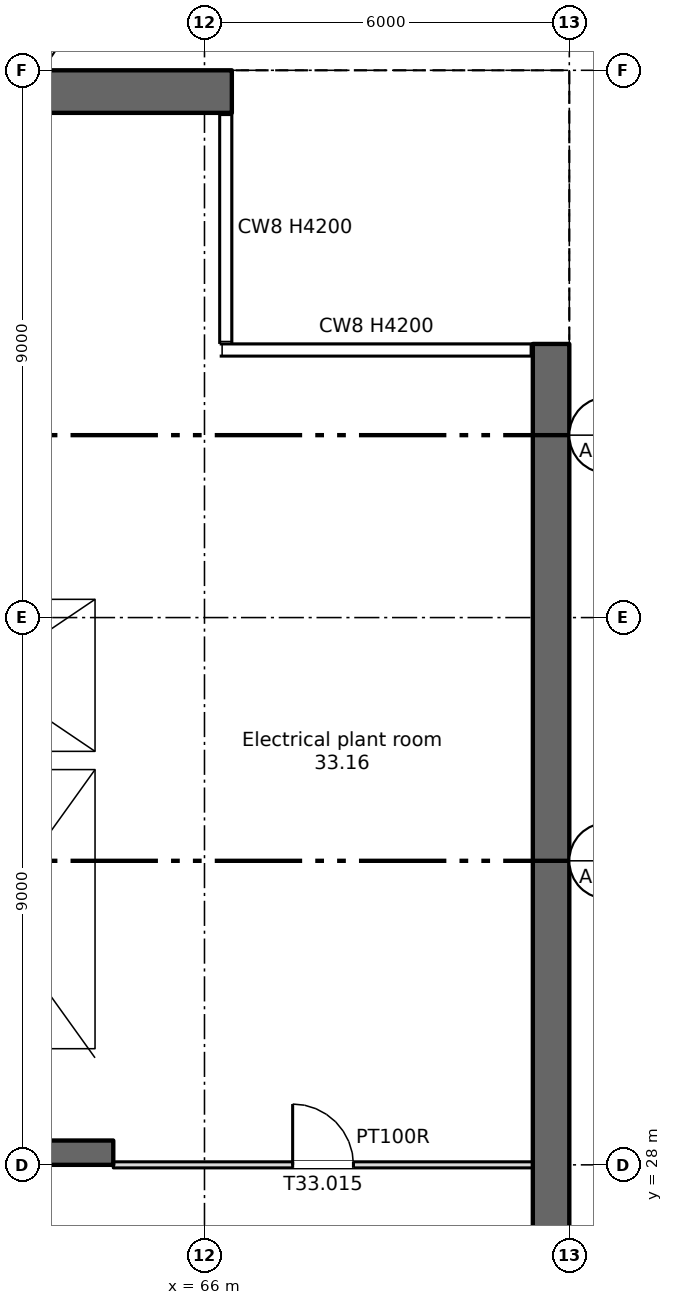
"""IFC4 building model, lengths in metres.
Left out: names, types, materials, properties, quantities, classifications, styles, units other than length and angle.
Written with IfcOpenShell. Run it as: python <this file> out.ifc"""

import sys

from ifc_helpers import new_model, si_unit, direction, frame, frame_2d, origin, place, context, subcontext, project, spatial, rectangle, extrude, element, fill, save


model = new_model("IFC4")
c1 = context("Model", 3, precision=1e-05, world=origin(), true_north=direction((0.0, 1.0)))
c2 = subcontext(c1, "Body", "Model", "MODEL_VIEW")
j1 = project(units=[si_unit("LENGTHUNIT", "METRE"), si_unit("PLANEANGLEUNIT", "RADIAN")], contexts=[c1])
p1 = place(None, origin())
s1 = spatial("IfcSite", under=j1, at=p1, CompositionType="ELEMENT")
p2 = place(p1, origin())
s2 = spatial("IfcBuilding", under=s1, at=p2, CompositionType="ELEMENT")
p3 = place(p2, frame((0.0, 0.0, 226.75)))
s3 = spatial("IfcBuildingStorey", under=s2, at=p3, CompositionType="ELEMENT", Elevation=226.75)
p4 = place(p3, frame((71.7, 7.5, 0.0), z_axis=(0.0, 0.0, 1.0), x_axis=(0.0, 1.0, 0.0)))
e1 = element("IfcWall", 1, at=p4, inside=s3, PredefinedType="SHEAR", context=c2, shape_type="SweptSolid", body=[
    extrude(rectangle(XDim=34.0, YDim=0.6, at=frame_2d((17.0, 0.0))), origin(), (0.0, 0.0, 1.0), 4.2),
])
p5 = place(p3, frame((11.55, 45.65, 0.0), z_axis=(0.0, 0.0, 1.0), x_axis=(1.0, 0.0, 0.0)))
e2 = element("IfcWall", 2, at=p5, inside=s3, PredefinedType="SHEAR", context=c2, shape_type="SweptSolid", body=[
    extrude(rectangle(XDim=54.9, YDim=0.7, at=frame_2d((27.45, 0.0))), origin(), (0.0, 0.0, 1.0), 4.2),
])
p6 = place(p3, frame((6.6, 28.2, 0.0), z_axis=(0.0, 0.0, 1.0), x_axis=(1.0, 0.0, 0.0)))
e3 = element("IfcWall", 3, at=p6, inside=s3, PredefinedType="SHEAR", context=c2, shape_type="SweptSolid", body=[
    extrude(rectangle(XDim=57.9, YDim=0.4, at=frame_2d((28.95, 0.0))), origin(), (0.0, 0.0, 1.0), 4.2),
])
p7 = place(p6, frame((13.95, 0.0, 0.0)))
e4 = element("IfcOpeningElement", 4, at=p7, cuts=e3, PredefinedType="OPENING", context=c2, shape_type="SweptSolid", body=[
    extrude(rectangle(XDim=0.9, YDim=2.1, at=frame_2d((0.45, 1.05))), frame((0.0, 0.21, 0.0), z_axis=(0.0, -1.0, 0.0), x_axis=(1.0, 0.0, 0.0)), (0.0, 0.0, 1.0), 0.42),
])
p8 = place(p6, frame((49.95, 0.0, 0.0)))
e5 = element("IfcOpeningElement", 5, at=p8, cuts=e3, PredefinedType="OPENING", context=c2, shape_type="SweptSolid", body=[
    extrude(rectangle(XDim=0.9, YDim=2.1, at=frame_2d((0.45, 1.05))), frame((0.0, 0.21, 0.0), z_axis=(0.0, -1.0, 0.0), x_axis=(1.0, 0.0, 0.0)), (0.0, 0.0, 1.0), 0.42),
])
p9 = place(p6, frame((1.45, 0.0, 0.0)))
e6 = element("IfcOpeningElement", 6, at=p9, cuts=e3, PredefinedType="OPENING", context=c2, shape_type="SweptSolid", body=[
    extrude(rectangle(XDim=0.9, YDim=2.1, at=frame_2d((0.45, 1.05))), frame((0.0, 0.21, 0.0), z_axis=(0.0, -1.0, 0.0), x_axis=(1.0, 0.0, 0.0)), (0.0, 0.0, 1.0), 0.42),
])
p10 = place(p6, frame((4.8, 0.0, 0.0)))
e7 = element("IfcOpeningElement", 7, at=p10, cuts=e3, PredefinedType="OPENING", context=c2, shape_type="SweptSolid", body=[
    extrude(rectangle(XDim=1.2, YDim=2.1, at=frame_2d((0.6, 1.05))), frame((0.0, 0.21, 0.0), z_axis=(0.0, -1.0, 0.0), x_axis=(1.0, 0.0, 0.0)), (0.0, 0.0, 1.0), 0.42),
])
p11 = place(p6, frame((31.8, 0.0, 0.0)))
e8 = element("IfcOpeningElement", 8, at=p11, cuts=e3, PredefinedType="OPENING", context=c2, shape_type="SweptSolid", body=[
    extrude(rectangle(XDim=1.2, YDim=2.1, at=frame_2d((0.6, 1.05))), frame((0.0, 0.21, 0.0), z_axis=(0.0, -1.0, 0.0), x_axis=(1.0, 0.0, 0.0)), (0.0, 0.0, 1.0), 0.42),
])
p12 = place(p6, frame((55.3, 0.0, 0.0)))
e9 = element("IfcOpeningElement", 9, at=p12, cuts=e3, PredefinedType="OPENING", context=c2, shape_type="SweptSolid", body=[
    extrude(rectangle(XDim=1.2, YDim=2.1, at=frame_2d((0.6, 1.05))), frame((0.0, 0.21, 0.0), z_axis=(0.0, -1.0, 0.0), x_axis=(1.0, 0.0, 0.0)), (0.0, 0.0, 1.0), 0.42),
])
p13 = place(p6, frame((21.8, 0.0, 0.0)))
e10 = element("IfcOpeningElement", 10, at=p13, cuts=e3, PredefinedType="OPENING", context=c2, shape_type="SweptSolid", body=[
    extrude(rectangle(XDim=1.2, YDim=2.1, at=frame_2d((0.6, 1.05))), frame((0.0, 0.21, 0.0), z_axis=(0.0, -1.0, 0.0), x_axis=(1.0, 0.0, 0.0)), (0.0, 0.0, 1.0), 0.42),
])
p14 = place(p6, frame((41.8, 0.0, 0.0)))
e11 = element("IfcOpeningElement", 11, at=p14, cuts=e3, PredefinedType="OPENING", context=c2, shape_type="SweptSolid", body=[
    extrude(rectangle(XDim=1.2, YDim=2.1, at=frame_2d((0.6, 1.05))), frame((0.0, 0.21, 0.0), z_axis=(0.0, -1.0, 0.0), x_axis=(1.0, 0.0, 0.0)), (0.0, 0.0, 1.0), 0.42),
])
p15 = place(p6, frame((24.95, 0.0, 0.0)))
e12 = element("IfcOpeningElement", 12, at=p15, cuts=e3, PredefinedType="OPENING", context=c2, shape_type="SweptSolid", body=[
    extrude(rectangle(XDim=2.4, YDim=2.1, at=frame_2d((1.2, 1.05))), frame((0.0, 0.21, 0.0), z_axis=(0.0, -1.0, 0.0), x_axis=(1.0, 0.0, 0.0)), (0.0, 0.0, 1.0), 0.42),
])
p16 = place(p6, frame((37.45, 0.0, 0.0)))
e13 = element("IfcOpeningElement", 13, at=p16, cuts=e3, PredefinedType="OPENING", context=c2, shape_type="SweptSolid", body=[
    extrude(rectangle(XDim=2.4, YDim=2.1, at=frame_2d((1.2, 1.05))), frame((0.0, 0.21, 0.0), z_axis=(0.0, -1.0, 0.0), x_axis=(1.0, 0.0, 0.0)), (0.0, 0.0, 1.0), 0.42),
])
p17 = place(p6, frame((7.95, 0.0, 0.0)))
e14 = element("IfcOpeningElement", 14, at=p17, cuts=e3, PredefinedType="OPENING", context=c2, shape_type="SweptSolid", body=[
    extrude(rectangle(XDim=2.4, YDim=2.1, at=frame_2d((1.2, 1.05))), frame((0.0, 0.21, 0.0), z_axis=(0.0, -1.0, 0.0), x_axis=(1.0, 0.0, 0.0)), (0.0, 0.0, 1.0), 0.42),
])
p18 = place(p6, frame((28.95, 0.0, 0.0)))
e15 = element("IfcOpeningElement", 15, at=p18, cuts=e3, PredefinedType="OPENING", context=c2, shape_type="SweptSolid", body=[
    extrude(rectangle(XDim=0.9, YDim=2.1, at=frame_2d((0.45, 1.05))), frame((0.0, 0.21, 0.0), z_axis=(0.0, -1.0, 0.0), x_axis=(1.0, 0.0, 0.0)), (0.0, 0.0, 1.0), 0.42),
])
p19 = place(p6, frame((34.95, 0.0, 0.0)))
e16 = element("IfcOpeningElement", 16, at=p19, cuts=e3, PredefinedType="OPENING", context=c2, shape_type="SweptSolid", body=[
    extrude(rectangle(XDim=0.9, YDim=2.1, at=frame_2d((0.45, 1.05))), frame((0.0, 0.21, 0.0), z_axis=(0.0, -1.0, 0.0), x_axis=(1.0, 0.0, 0.0)), (0.0, 0.0, 1.0), 0.42),
])
p20 = place(p3, frame((64.35, 34.8, 0.0), z_axis=(0.0, 0.0, 1.0), x_axis=(0.0, 1.0, 0.0)))
e17 = element("IfcWall", 17, at=p20, inside=s3, PredefinedType="SHEAR", context=c2, shape_type="SweptSolid", body=[
    extrude(rectangle(XDim=10.5, YDim=0.3, at=frame_2d((5.25, 0.0))), origin(), (0.0, 0.0, 1.0), 4.2),
])
p21 = place(p3, frame((64.35, 28.4, 0.0), z_axis=(0.0, 0.0, 1.0), x_axis=(0.0, 1.0, 0.0)))
e18 = element("IfcWall", 18, at=p21, inside=s3, PredefinedType="SHEAR", context=c2, shape_type="SweptSolid", body=[
    extrude(rectangle(XDim=6.1, YDim=0.3, at=frame_2d((3.05, 0.0))), origin(), (0.0, 0.0, 1.0), 4.2),
])
p22 = place(p3, frame((60.5, 34.65, 0.0), z_axis=(0.0, 0.0, 1.0), x_axis=(1.0, 0.0, 0.0)))
e19 = element("IfcWall", 19, at=p22, inside=s3, PredefinedType="SHEAR", context=c2, shape_type="SweptSolid", body=[
    extrude(rectangle(XDim=4.0, YDim=0.3, at=frame_2d((2.0, 0.0))), origin(), (0.0, 0.0, 1.0), 4.2),
])
p23 = place(p3, frame((60.5, 37.45, 0.0), z_axis=(0.0, 0.0, 1.0), x_axis=(1.0, 0.0, 0.0)))
e20 = element("IfcWall", 20, at=p23, inside=s3, PredefinedType="SHEAR", context=c2, shape_type="SweptSolid", body=[
    extrude(rectangle(XDim=3.7, YDim=0.3, at=frame_2d((1.85, 0.0))), origin(), (0.0, 0.0, 1.0), 4.2),
])
p24 = place(p23, frame((1.3, 0.0, 0.0)))
e21 = element("IfcOpeningElement", 21, at=p24, cuts=e20, PredefinedType="OPENING", context=c2, shape_type="SweptSolid", body=[
    extrude(rectangle(XDim=1.1, YDim=2.1, at=frame_2d((0.55, 1.05))), frame((0.0, 0.16, 0.0), z_axis=(0.0, -1.0, 0.0), x_axis=(1.0, 0.0, 0.0)), (0.0, 0.0, 1.0), 0.32),
])
p25 = place(p3, frame((64.5, 28.0, 0.0), z_axis=(0.0, 0.0, 1.0), x_axis=(1.0, 0.0, 0.0)))
e22 = element("IfcWall", 22, at=p25, inside=s3, PredefinedType="PARTITIONING", context=c2, shape_type="SweptSolid", body=[
    extrude(rectangle(XDim=6.9, YDim=0.1, at=frame_2d((3.45, 0.0))), origin(), (0.0, 0.0, 1.0), 4.2),
])
p26 = place(p25, frame((2.95, 0.0, 0.0)))
e23 = element("IfcOpeningElement", 23, at=p26, cuts=e22, PredefinedType="OPENING", context=c2, shape_type="SweptSolid", body=[
    extrude(rectangle(XDim=1.0, YDim=2.1, at=frame_2d((0.5, 1.05))), frame((0.0, 0.06, 0.0), z_axis=(0.0, -1.0, 0.0), x_axis=(1.0, 0.0, 0.0)), (0.0, 0.0, 1.0), 0.12),
])
p27 = place(p26, origin())
e24 = element("IfcDoor", 24, at=p27, inside=s3, OperationType="SINGLE_SWING_LEFT", PredefinedType="DOOR", context=c2, shape_type="SweptSolid", body=[
    extrude(rectangle(XDim=1.0, YDim=2.1, at=frame_2d((0.5, 1.05))), frame((0.0, 0.025, 0.0), z_axis=(0.0, -1.0, 0.0), x_axis=(1.0, 0.0, 0.0)), (0.0, 0.0, 1.0), 0.05),
])
fill(e23, e24)
save(model, sys.argv[1])
